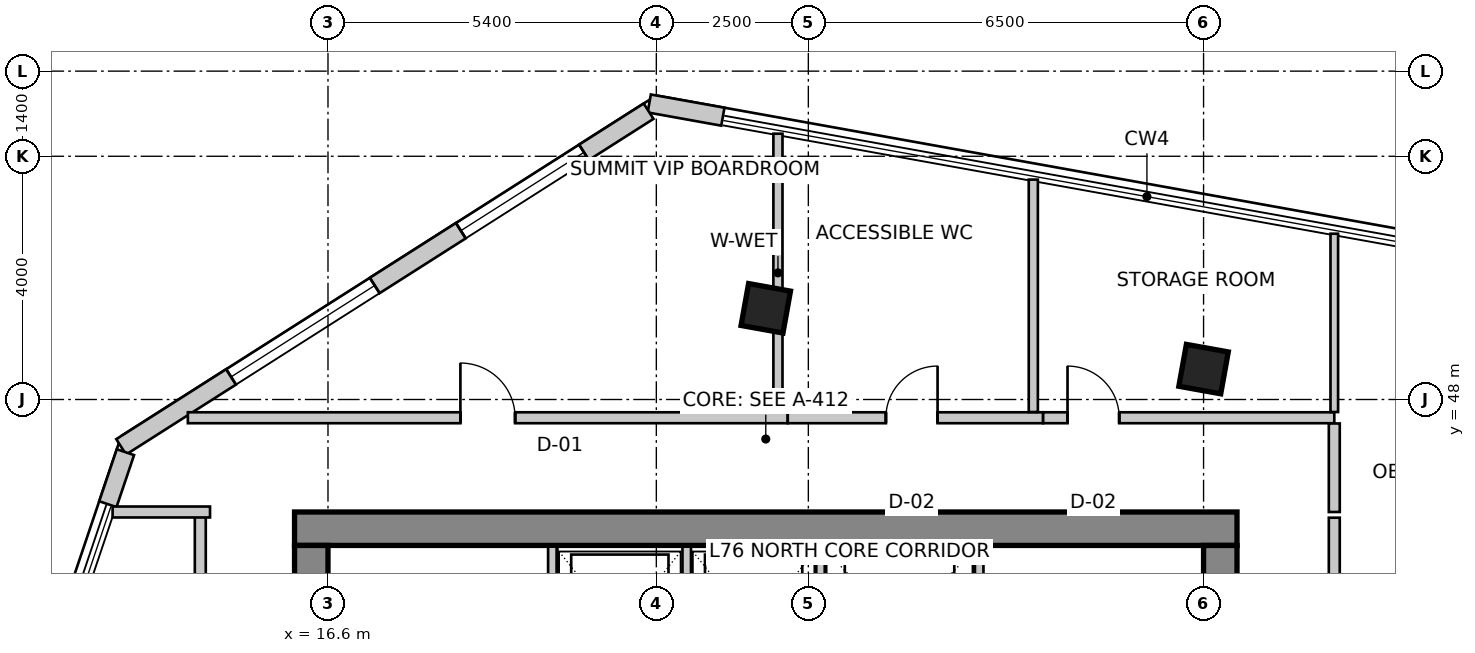
"""IFC4 building model, lengths in metres.
Left out: names, types, materials, properties, quantities, classifications, styles, units other than length and angle.
Written with IfcOpenShell. Run it as: python <this file> out.ifc"""

import sys

from ifc_helpers import new_model, si_unit, direction, frame, frame_2d, origin, origin_2d, place, context, subcontext, project, spatial, rectangle, extrude, source, transform, mapped, element, fill, save


model = new_model("IFC4")
c1 = context("Model", 3, precision=1e-05, world=origin(), true_north=direction((0.0, 1.0)))
c2 = subcontext(c1, "Body", "Model", "MODEL_VIEW")
j1 = project(units=[si_unit("LENGTHUNIT", "METRE"), si_unit("PLANEANGLEUNIT", "RADIAN")], contexts=[c1])
p1 = place(None, origin())
s1 = spatial("IfcSite", under=j1, at=p1, CompositionType="ELEMENT")
p2 = place(p1, origin())
s2 = spatial("IfcBuilding", under=s1, at=p2, CompositionType="ELEMENT")
p3 = place(p2, frame((0.0, 0.0, 296.5)))
s3 = spatial("IfcBuildingStorey", under=s2, at=p3, CompositionType="ELEMENT", Elevation=296.5)
p4 = place(p3, frame((16.05, 45.875, 0.0), z_axis=(0.0, 0.0, 1.0), x_axis=(1.0, 0.0, 0.0)))
e1 = element("IfcWall", 1, at=p4, inside=s3, PredefinedType="SHEAR", context=c2, shape_type="SweptSolid", body=[
    extrude(rectangle(XDim=15.5, YDim=0.55, at=frame_2d((7.75, 0.0))), origin(), (0.0, 0.0, 1.0), 4.0),
])
p5 = place(p3, frame((16.325, 34.2, 0.0), z_axis=(0.0, 0.0, 1.0), x_axis=(0.0, 1.0, 0.0)))
e2 = element("IfcWall", 2, at=p5, inside=s3, PredefinedType="SHEAR", context=c2, shape_type="SweptSolid", body=[
    extrude(rectangle(XDim=11.4, YDim=0.55, at=frame_2d((5.7, 0.0))), origin(), (0.0, 0.0, 1.0), 4.0),
])
m1 = source(origin(), c2, "Body", "SweptSolid", [
    extrude(rectangle(XDim=1.1, YDim=2.15, at=frame_2d((0.55, 1.075))), frame((0.0, 0.285, 0.0), z_axis=(0.0, -1.0, 0.0), x_axis=(1.0, 0.0, 0.0)), (0.0, 0.0, 1.0), 0.57),
])
p6 = place(p5, frame((7.15, 0.0, 0.0)))
e3 = element("IfcOpeningElement", 3, at=p6, cuts=e2, PredefinedType="OPENING", context=c2, shape_type="MappedRepresentation", body=[
    mapped(m1, transform((0.0, 0.0, 0.0), scale=1.0)),
])
p7 = place(p3, frame((31.275, 34.2, 0.0), z_axis=(0.0, 0.0, 1.0), x_axis=(0.0, 1.0, 0.0)))
e4 = element("IfcWall", 4, at=p7, inside=s3, PredefinedType="SHEAR", context=c2, shape_type="SweptSolid", body=[
    extrude(rectangle(XDim=11.4, YDim=0.55, at=frame_2d((5.7, 0.0))), origin(), (0.0, 0.0, 1.0), 4.0),
])
p8 = place(p7, frame((7.35, 0.0, 0.0)))
e5 = element("IfcOpeningElement", 5, at=p8, cuts=e4, PredefinedType="OPENING", context=c2, shape_type="MappedRepresentation", body=[
    mapped(m1, transform((0.0, 0.0, 0.0), scale=1.0)),
])
m2 = source(origin(), c2, "Body", "SweptSolid", [
    extrude(rectangle(XDim=0.7, YDim=0.7, at=origin_2d()), origin(), (0.0, 0.0, 1.0), 4.0),
])
for number, where, z_axis, x_axis in (
    (6, (23.8, 49.5, 0.0), (0.0, 0.0, 1.0), (0.984, -0.177, 0.0)),
    (7, (31.0, 48.5, 0.0), (0.0, 0.0, 1.0), (0.984, -0.177, 0.0)),
):
    element("IfcColumn", number, at=place(p3, frame(where, z_axis=z_axis, x_axis=x_axis)), inside=s3, PredefinedType="COLUMN", context=c2, shape_type="MappedRepresentation", body=[
        mapped(m2, transform((0.0, 0.0, 0.0), scale=1.0)),
    ])
p9 = place(p3, frame((23.094, 52.651, 0.0), z_axis=(0.0, 0.0, 1.0), x_axis=(-0.984233125072, 0.176876102146, 0.0)))
e8 = element("IfcWall", 8, at=p9, inside=s3, PredefinedType="SOLIDWALL", context=c2, shape_type="SweptSolid", body=[
    extrude(rectangle(XDim=1.23, YDim=0.3, at=frame_2d((0.615, 0.0))), origin(), (0.0, 0.0, 1.0), 3.75),
])
p10 = place(p3, frame((21.873, 52.741, 0.0), z_axis=(0.0, 0.0, 1.0), x_axis=(-0.843661487732, -0.536875492193, 0.0)))
e9 = element("IfcWall", 9, at=p10, inside=s3, PredefinedType="SOLIDWALL", context=c2, shape_type="SweptSolid", body=[
    extrude(rectangle(XDim=10.282, YDim=0.3, at=frame_2d((5.141, 0.0))), origin(), (0.0, 0.0, 1.0), 3.75),
])
m3 = source(origin(), c2, "Body", "SweptSolid", [
    extrude(rectangle(XDim=2.4, YDim=2.2, at=frame_2d((1.2, 1.1))), frame((0.0, 0.16, 0.0), z_axis=(0.0, -1.0, 0.0), x_axis=(1.0, 0.0, 0.0)), (0.0, 0.0, 1.0), 0.32),
])
p11 = place(p10, frame((1.26, 0.0, 0.85)))
e10 = element("IfcOpeningElement", 10, at=p11, cuts=e9, PredefinedType="OPENING", context=c2, shape_type="MappedRepresentation", body=[
    mapped(m3, transform((0.0, 0.0, 0.0), scale=1.0)),
])
m4 = source(origin(), c2, "Body", "SweptSolid", [
    extrude(rectangle(XDim=2.8, YDim=2.4, at=frame_2d((1.4, 1.2))), frame((0.0, 0.16, 0.0), z_axis=(0.0, -1.0, 0.0), x_axis=(1.0, 0.0, 0.0)), (0.0, 0.0, 1.0), 0.32),
])
p12 = place(p10, frame((5.339, 0.0, 0.85)))
e11 = element("IfcOpeningElement", 11, at=p12, cuts=e9, PredefinedType="OPENING", context=c2, shape_type="MappedRepresentation", body=[
    mapped(m4, transform((0.0, 0.0, 0.0), scale=1.0)),
])
p13 = place(p3, frame((13.269, 47.134, 0.0), z_axis=(0.0, 0.0, 1.0), x_axis=(-0.31995770778, -0.947431826166, 0.0)))
e12 = element("IfcWall", 12, at=p13, inside=s3, PredefinedType="SOLIDWALL", context=c2, shape_type="SweptSolid", body=[
    extrude(rectangle(XDim=0.903, YDim=0.3, at=frame_2d((0.451, 0.0))), origin(), (0.0, 0.0, 1.0), 3.75),
])
for number, where, z_axis, x_axis in (
    (13, (20.29, 43.28, 0.0), (0.0, 0.0, 1.0), (0.0, 1.0, 0.0)),
    (14, (27.31, 43.28, 0.0), (0.0, 0.0, 1.0), (0.0, 1.0, 0.0)),
):
    element("IfcWall", number, at=place(p3, frame(where, z_axis=z_axis, x_axis=x_axis)), inside=s3, PredefinedType="SOLIDWALL", context=c2, shape_type="SweptSolid", body=[
        extrude(rectangle(XDim=2.3, YDim=0.14, at=frame_2d((1.15, 0.0))), origin(), (0.0, 0.0, 1.0), 3.75),
    ])
for number, where, z_axis, x_axis in (
    (15, (22.5, 43.02, 0.0), (0.0, 0.0, 1.0), (0.0, 1.0, 0.0)),
    (16, (24.7, 43.02, 0.0), (0.0, 0.0, 1.0), (0.0, 1.0, 0.0)),
):
    element("IfcWall", number, at=place(p3, frame(where, z_axis=z_axis, x_axis=x_axis)), inside=s3, PredefinedType="SOLIDWALL", context=c2, shape_type="SweptSolid", body=[
        extrude(rectangle(XDim=2.56, YDim=0.14, at=frame_2d((1.28, 0.0))), origin(), (0.0, 0.0, 1.0), 3.75),
    ])
p14 = place(p3, frame((14.5, 33.744, 0.0), z_axis=(0.0, 0.0, 1.0), x_axis=(0.0, 1.0, 0.0)))
e17 = element("IfcWall", 17, at=p14, inside=s3, PredefinedType="PARTITIONING", context=c2, shape_type="SweptSolid", body=[
    extrude(rectangle(XDim=12.406, YDim=0.18, at=frame_2d((6.203, 0.0))), origin(), (0.0, 0.0, 1.0), 3.75),
])
m5 = source(origin(), c2, "Body", "SweptSolid", [
    extrude(rectangle(XDim=0.9, YDim=2.15, at=frame_2d((0.45, 1.075))), frame((0.0, 0.1, 0.0), z_axis=(0.0, -1.0, 0.0), x_axis=(1.0, 0.0, 0.0)), (0.0, 0.0, 1.0), 0.2),
])
p15 = place(p14, frame((4.37, 0.0, 0.0)))
e18 = element("IfcOpeningElement", 18, at=p15, cuts=e17, PredefinedType="OPENING", context=c2, shape_type="MappedRepresentation", body=[
    mapped(m5, transform((0.0, 0.0, 0.0), scale=1.0)),
])
p16 = place(p3, frame((14.66, 46.15, 0.0), z_axis=(0.0, 0.0, 1.0), x_axis=(-1.0, 0.0, 0.0)))
e19 = element("IfcWall", 19, at=p16, inside=s3, PredefinedType="PARTITIONING", context=c2, shape_type="SweptSolid", body=[
    extrude(rectangle(XDim=1.602, YDim=0.18, at=frame_2d((0.801, 0.0))), origin(), (0.0, 0.0, 1.0), 3.75),
])
p17 = place(p3, frame((14.295, 47.7, 0.0), z_axis=(0.0, 0.0, 1.0), x_axis=(1.0, 0.0, 0.0)))
e20 = element("IfcWall", 20, at=p17, inside=s3, PredefinedType="PARTITIONING", context=c2, shape_type="SweptSolid", body=[
    extrude(rectangle(XDim=9.865, YDim=0.18, at=frame_2d((4.932, 0.0))), origin(), (0.0, 0.0, 1.0), 3.419),
])
p18 = place(p17, frame((4.482, 0.0, 0.0)))
e21 = element("IfcOpeningElement", 21, at=p18, cuts=e20, PredefinedType="OPENING", context=c2, shape_type="MappedRepresentation", body=[
    mapped(m5, transform((0.0, 0.0, 0.0), scale=1.0)),
])
p19 = place(p3, frame((24.162, 47.7, 0.0), z_axis=(0.0, 0.0, 1.0), x_axis=(1.0, 0.0, 0.0)))
e22 = element("IfcWall", 22, at=p19, inside=s3, PredefinedType="PARTITIONING", context=c2, shape_type="SweptSolid", body=[
    extrude(rectangle(XDim=4.198, YDim=0.18, at=frame_2d((2.099, 0.0))), origin(), (0.0, 0.0, 1.0), 3.75),
])
m6 = source(origin(), c2, "Body", "SweptSolid", [
    extrude(rectangle(XDim=0.85, YDim=2.15, at=frame_2d((0.425, 1.075))), frame((0.0, 0.1, 0.0), z_axis=(0.0, -1.0, 0.0), x_axis=(1.0, 0.0, 0.0)), (0.0, 0.0, 1.0), 0.2),
])
p20 = place(p19, frame((1.613, 0.0, 0.0)))
e23 = element("IfcOpeningElement", 23, at=p20, cuts=e22, PredefinedType="OPENING", context=c2, shape_type="MappedRepresentation", body=[
    mapped(m6, transform((0.0, 0.0, 0.0), scale=1.0)),
])
p21 = place(p3, frame((28.362, 47.7, 0.0), z_axis=(0.0, 0.0, 1.0), x_axis=(1.0, 0.0, 0.0)))
e24 = element("IfcWall", 24, at=p21, inside=s3, PredefinedType="PARTITIONING", context=c2, shape_type="SweptSolid", body=[
    extrude(rectangle(XDim=4.788, YDim=0.18, at=frame_2d((2.394, 0.0))), origin(), (0.0, 0.0, 1.0), 3.279),
])
p22 = place(p21, frame((0.401, 0.0, 0.0)))
e25 = element("IfcOpeningElement", 25, at=p22, cuts=e24, PredefinedType="OPENING", context=c2, shape_type="MappedRepresentation", body=[
    mapped(m6, transform((0.0, 0.0, 0.0), scale=1.0)),
])
p23 = place(p3, frame((33.15, 47.606, 0.0), z_axis=(0.0, 0.0, 1.0), x_axis=(0.0, -1.0, 0.0)))
e26 = element("IfcWall", 26, at=p23, inside=s3, PredefinedType="PARTITIONING", context=c2, shape_type="SweptSolid", body=[
    extrude(rectangle(XDim=1.456, YDim=0.18, at=frame_2d((0.728, 0.0))), origin(), (0.0, 0.0, 1.0), 3.75),
])
p24 = place(p3, frame((33.15, 46.056, 0.0), z_axis=(0.0, 0.0, 1.0), x_axis=(0.0, -1.0, 0.0)))
e27 = element("IfcWall", 27, at=p24, inside=s3, PredefinedType="PARTITIONING", context=c2, shape_type="SweptSolid", body=[
    extrude(rectangle(XDim=6.216, YDim=0.18, at=frame_2d((3.108, 0.0))), origin(), (0.0, 0.0, 1.0), 3.279),
])
m7 = source(origin(), c2, "Body", "SweptSolid", [
    extrude(rectangle(XDim=1.6, YDim=2.15, at=frame_2d((0.8, 1.075))), frame((0.0, 0.1, 0.0), z_axis=(0.0, -1.0, 0.0), x_axis=(1.0, 0.0, 0.0)), (0.0, 0.0, 1.0), 0.2),
])
p25 = place(p24, frame((2.247, 0.0, 0.0)))
e28 = element("IfcOpeningElement", 28, at=p25, cuts=e27, PredefinedType="OPENING", context=c2, shape_type="MappedRepresentation", body=[
    mapped(m7, transform((0.0, 0.0, 0.0), scale=1.0)),
])
p26 = place(p3, frame((24.0, 52.371, 0.0), z_axis=(0.0, 0.0, 1.0), x_axis=(0.0, -1.0, 0.0)))
e29 = element("IfcWall", 29, at=p26, inside=s3, PredefinedType="PARTITIONING", context=c2, shape_type="SweptSolid", body=[
    extrude(rectangle(XDim=4.577, YDim=0.15, at=frame_2d((2.289, 0.0))), origin(), (0.0, 0.0, 1.0), 3.042),
])
p27 = place(p3, frame((28.2, 51.616, 0.0), z_axis=(0.0, 0.0, 1.0), x_axis=(0.0, -1.0, 0.0)))
e30 = element("IfcWall", 30, at=p27, inside=s3, PredefinedType="PARTITIONING", context=c2, shape_type="SweptSolid", body=[
    extrude(rectangle(XDim=3.822, YDim=0.15, at=frame_2d((1.911, 0.0))), origin(), (0.0, 0.0, 1.0), 3.042),
])
p28 = place(p3, frame((33.15, 50.727, 0.0), z_axis=(0.0, 0.0, 1.0), x_axis=(0.0, -1.0, 0.0)))
e31 = element("IfcWall", 31, at=p28, inside=s3, PredefinedType="PARTITIONING", context=c2, shape_type="SweptSolid", body=[
    extrude(rectangle(XDim=2.933, YDim=0.125, at=frame_2d((1.466, 0.0))), origin(), (0.0, 0.0, 1.0), 3.042),
])
m8 = source(origin(), c2, "Body", "SweptSolid", [
    extrude(rectangle(XDim=2.4, YDim=2.2, at=frame_2d((1.2, 1.1))), frame((0.0, -0.015, 0.0), z_axis=(0.0, -1.0, 0.0), x_axis=(1.0, 0.0, 0.0)), (0.0, 0.0, 1.0), 0.06),
])
p29 = place(p11, origin())
e32 = element("IfcWindow", 32, at=p29, inside=s3, PartitioningType="SINGLE_PANEL", PredefinedType="WINDOW", context=c2, shape_type="MappedRepresentation", body=[
    mapped(m8, transform((0.0, 0.0, 0.0), scale=1.0)),
])
fill(e10, e32)
m9 = source(origin(), c2, "Body", "SweptSolid", [
    extrude(rectangle(XDim=2.8, YDim=2.4, at=frame_2d((1.4, 1.2))), frame((0.0, -0.015, 0.0), z_axis=(0.0, -1.0, 0.0), x_axis=(1.0, 0.0, 0.0)), (0.0, 0.0, 1.0), 0.06),
])
p30 = place(p12, origin())
e33 = element("IfcWindow", 33, at=p30, inside=s3, PartitioningType="SINGLE_PANEL", PredefinedType="WINDOW", context=c2, shape_type="MappedRepresentation", body=[
    mapped(m9, transform((0.0, 0.0, 0.0), scale=1.0)),
])
fill(e11, e33)
m10 = source(origin(), c2, "Body", "SweptSolid", [
    extrude(rectangle(XDim=0.9, YDim=2.15, at=frame_2d((0.45, 1.075))), frame((0.0, 0.025, 0.0), z_axis=(0.0, -1.0, 0.0), x_axis=(1.0, 0.0, 0.0)), (0.0, 0.0, 1.0), 0.05),
])
p31 = place(p18, origin())
e34 = element("IfcDoor", 34, at=p31, inside=s3, OperationType="SINGLE_SWING_LEFT", PredefinedType="DOOR", context=c2, shape_type="MappedRepresentation", body=[
    mapped(m10, transform((0.0, 0.0, 0.0), scale=1.0)),
])
fill(e21, e34)
m11 = source(origin(), c2, "Body", "SweptSolid", [
    extrude(rectangle(XDim=0.85, YDim=2.15, at=frame_2d((0.425, 1.075))), frame((0.0, 0.025, 0.0), z_axis=(0.0, -1.0, 0.0), x_axis=(1.0, 0.0, 0.0)), (0.0, 0.0, 1.0), 0.05),
])
p32 = place(p20, origin())
e35 = element("IfcDoor", 35, at=p32, inside=s3, OperationType="SINGLE_SWING_RIGHT", PredefinedType="DOOR", context=c2, shape_type="MappedRepresentation", body=[
    mapped(m11, transform((0.0, 0.0, 0.0), scale=1.0)),
])
fill(e23, e35)
p33 = place(p22, origin())
e36 = element("IfcDoor", 36, at=p33, inside=s3, OperationType="SINGLE_SWING_LEFT", PredefinedType="DOOR", context=c2, shape_type="MappedRepresentation", body=[
    mapped(m11, transform((0.0, 0.0, 0.0), scale=1.0)),
])
fill(e25, e36)
save(model, sys.argv[1])
